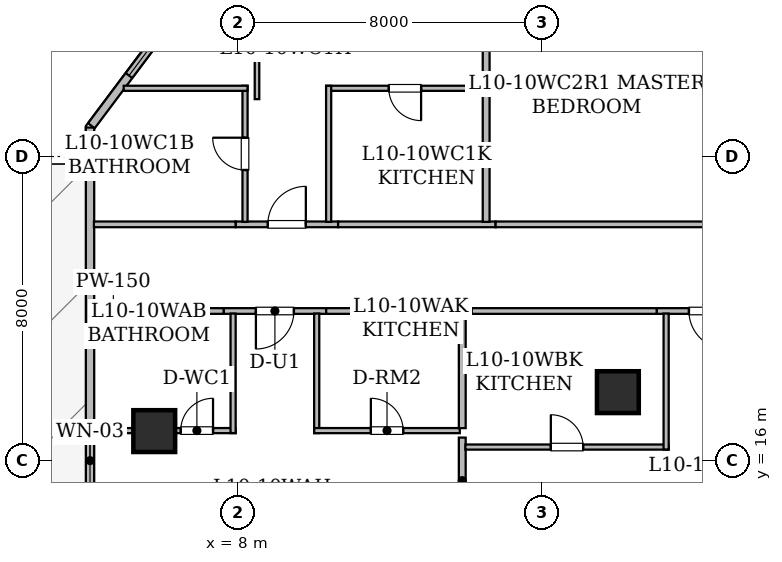
"""IFC4 building model, lengths in metres.
Left out: names, types, materials, properties, quantities, classifications, styles, units other than length and angle.
Written with IfcOpenShell. Run it as: python <this file> out.ifc"""

import sys

from ifc_helpers import new_model, si_unit, direction, frame, frame_2d, origin, origin_2d, place, context, subcontext, project, spatial, rectangle, hollow_rectangle, extrude, element, fill, save


model = new_model("IFC4")
c1 = context("Model", 3, precision=1e-05, world=origin(), true_north=direction((0.0, 1.0)))
c2 = subcontext(c1, "Body", "Model", "MODEL_VIEW")
j1 = project(units=[si_unit("LENGTHUNIT", "METRE"), si_unit("PLANEANGLEUNIT", "RADIAN")], contexts=[c1])
p1 = place(None, origin())
s1 = spatial("IfcSite", under=j1, at=p1, CompositionType="ELEMENT")
p2 = place(p1, origin())
s2 = spatial("IfcBuilding", under=s1, at=p2, CompositionType="ELEMENT")
p3 = place(p2, frame((0.0, 0.0, 44.25)))
s3 = spatial("IfcBuildingStorey", under=s2, at=p3, CompositionType="ELEMENT", Elevation=44.25)
for number, where, z_axis, x_axis in (
    (1, (5.8, 16.775, 0.0), (0.0, 0.0, 1.0), (1.0, 0.0, 0.0)),
    (2, (18.0, 17.8, 0.0), (0.0, 0.0, 1.0), (1.0, 0.0, 0.0)),
):
    element("IfcColumn", number, at=place(p3, frame(where, z_axis=z_axis, x_axis=x_axis)), inside=s3, PredefinedType="COLUMN", context=c2, shape_type="SweptSolid", body=[
        extrude(hollow_rectangle(XDim=1.1, YDim=1.1, WallThickness=0.055, at=origin_2d()), origin(), (0.0, 0.0, 1.0), 3.65),
    ])
p4 = place(p3, frame((4.11, 7.317, 0.0), z_axis=(0.0, 0.0, 1.0), x_axis=(0.0, 1.0, 0.0)))
e3 = element("IfcWall", 3, at=p4, inside=s3, PredefinedType="STANDARD", context=c2, shape_type="SweptSolid", body=[
    extrude(rectangle(XDim=17.446, YDim=0.22, at=frame_2d((8.723, 0.0))), origin(), (0.0, 0.0, 1.0), 3.43),
])
p5 = place(p4, frame((4.989, 0.0, 0.0)))
e4 = element("IfcOpeningElement", 4, at=p5, cuts=e3, PredefinedType="OPENING", context=c2, shape_type="SweptSolid", body=[
    extrude(rectangle(XDim=1.1, YDim=2.2, at=frame_2d((0.55, 1.1))), frame((0.0, 0.12, 0.0), z_axis=(0.0, -1.0, 0.0), x_axis=(1.0, 0.0, 0.0)), (0.0, 0.0, 1.0), 0.24),
])
p6 = place(p4, frame((8.081, 0.0, 0.8)))
e5 = element("IfcOpeningElement", 5, at=p6, cuts=e3, PredefinedType="OPENING", context=c2, shape_type="SweptSolid", body=[
    extrude(rectangle(XDim=1.2, YDim=1.5, at=frame_2d((0.6, 0.75))), frame((0.0, 0.12, 0.0), z_axis=(0.0, -1.0, 0.0), x_axis=(1.0, 0.0, 0.0)), (0.0, 0.0, 1.0), 0.24),
])
p7 = place(p3, frame((4.145, 24.809, 0.0), z_axis=(0.0, 0.0, 1.0), x_axis=(0.599823674734, 0.800132213592, 0.0)))
e6 = element("IfcWall", 6, at=p7, inside=s3, PredefinedType="STANDARD", context=c2, shape_type="SweptSolid", body=[
    extrude(rectangle(XDim=3.988, YDim=0.22, at=frame_2d((1.994, 0.0))), origin(), (0.0, 0.0, 1.0), 3.43),
])
p8 = place(p7, frame((1.651, 0.0, 0.85)))
e7 = element("IfcOpeningElement", 7, at=p8, cuts=e6, PredefinedType="OPENING", context=c2, shape_type="SweptSolid", body=[
    extrude(rectangle(XDim=1.65, YDim=1.55, at=frame_2d((0.825, 0.775))), frame((0.0, 0.12, 0.0), z_axis=(0.0, -1.0, 0.0), x_axis=(1.0, 0.0, 0.0)), (0.0, 0.0, 1.0), 0.24),
])
p9 = place(p3, frame((10.324, 19.935, 0.0), z_axis=(0.0, 0.0, 1.0), x_axis=(-1.0, 0.0, 0.0)))
e8 = element("IfcWall", 8, at=p9, inside=s3, PredefinedType="STANDARD", context=c2, shape_type="SweptSolid", body=[
    extrude(rectangle(XDim=2.698, YDim=0.15, at=frame_2d((1.349, 0.0))), origin(), (0.0, 0.0, 1.0), 3.43),
])
p10 = place(p9, frame((0.849, 0.0, 0.0)))
e9 = element("IfcOpeningElement", 9, at=p10, cuts=e8, PredefinedType="OPENING", context=c2, shape_type="SweptSolid", body=[
    extrude(rectangle(XDim=1.0, YDim=2.15, at=frame_2d((0.5, 1.075))), frame((0.0, 0.085, 0.0), z_axis=(0.0, -1.0, 0.0), x_axis=(1.0, 0.0, 0.0)), (0.0, 0.0, 1.0), 0.17),
])
p11 = place(p3, frame((7.626, 19.935, 0.0), z_axis=(0.0, 0.0, 1.0), x_axis=(-1.0, 0.0, 0.0)))
e10 = element("IfcWall", 10, at=p11, inside=s3, PredefinedType="STANDARD", context=c2, shape_type="SweptSolid", body=[
    extrude(rectangle(XDim=3.414, YDim=0.15, at=frame_2d((1.707, 0.0))), origin(), (0.0, 0.0, 1.0), 2.803),
])
p12 = place(p3, frame((14.154, 19.935, 0.0), z_axis=(0.0, 0.0, 1.0), x_axis=(-1.0, 0.0, 0.0)))
e11 = element("IfcWall", 11, at=p12, inside=s3, PredefinedType="STANDARD", context=c2, shape_type="SweptSolid", body=[
    extrude(rectangle(XDim=3.83, YDim=0.15, at=frame_2d((1.915, 0.0))), origin(), (0.0, 0.0, 1.0), 3.43),
])
p13 = place(p3, frame((21.719, 19.935, 0.0), z_axis=(0.0, 0.0, 1.0), x_axis=(-1.0, 0.0, 0.0)))
e12 = element("IfcWall", 12, at=p13, inside=s3, PredefinedType="STANDARD", context=c2, shape_type="SweptSolid", body=[
    extrude(rectangle(XDim=2.698, YDim=0.15, at=frame_2d((1.349, 0.0))), origin(), (0.0, 0.0, 1.0), 3.43),
])
p14 = place(p13, frame((0.849, 0.0, 0.0)))
e13 = element("IfcOpeningElement", 13, at=p14, cuts=e12, PredefinedType="OPENING", context=c2, shape_type="SweptSolid", body=[
    extrude(rectangle(XDim=1.0, YDim=2.15, at=frame_2d((0.5, 1.075))), frame((0.0, 0.085, 0.0), z_axis=(0.0, -1.0, 0.0), x_axis=(1.0, 0.0, 0.0)), (0.0, 0.0, 1.0), 0.17),
])
p15 = place(p3, frame((19.021, 19.935, 0.0), z_axis=(0.0, 0.0, 1.0), x_axis=(-1.0, 0.0, 0.0)))
e14 = element("IfcWall", 14, at=p15, inside=s3, PredefinedType="STANDARD", context=c2, shape_type="SweptSolid", body=[
    extrude(rectangle(XDim=4.867, YDim=0.15, at=frame_2d((2.434, 0.0))), origin(), (0.0, 0.0, 1.0), 2.647),
])
p16 = place(p3, frame((7.94, 22.215, 0.0), z_axis=(0.0, 0.0, 1.0), x_axis=(1.0, 0.0, 0.0)))
e15 = element("IfcWall", 15, at=p16, inside=s3, PredefinedType="STANDARD", context=c2, shape_type="SweptSolid", body=[
    extrude(rectangle(XDim=2.698, YDim=0.15, at=frame_2d((1.349, 0.0))), origin(), (0.0, 0.0, 1.0), 3.43),
])
p17 = place(p16, frame((0.849, 0.0, 0.0)))
e16 = element("IfcOpeningElement", 16, at=p17, cuts=e15, PredefinedType="OPENING", context=c2, shape_type="SweptSolid", body=[
    extrude(rectangle(XDim=1.0, YDim=2.15, at=frame_2d((0.5, 1.075))), frame((0.0, 0.085, 0.0), z_axis=(0.0, -1.0, 0.0), x_axis=(1.0, 0.0, 0.0)), (0.0, 0.0, 1.0), 0.17),
])
p18 = place(p3, frame((4.212, 22.215, 0.0), z_axis=(0.0, 0.0, 1.0), x_axis=(1.0, 0.0, 0.0)))
e17 = element("IfcWall", 17, at=p18, inside=s3, PredefinedType="STANDARD", context=c2, shape_type="SweptSolid", body=[
    extrude(rectangle(XDim=3.728, YDim=0.15, at=frame_2d((1.864, 0.0))), origin(), (0.0, 0.0, 1.0), 2.803),
])
p19 = place(p3, frame((10.638, 22.215, 0.0), z_axis=(0.0, 0.0, 1.0), x_axis=(1.0, 0.0, 0.0)))
e18 = element("IfcWall", 18, at=p19, inside=s3, PredefinedType="STANDARD", context=c2, shape_type="SweptSolid", body=[
    extrude(rectangle(XDim=4.145, YDim=0.15, at=frame_2d((2.073, 0.0))), origin(), (0.0, 0.0, 1.0), 3.43),
])
p20 = place(p3, frame((14.783, 22.215, 0.0), z_axis=(0.0, 0.0, 1.0), x_axis=(1.0, 0.0, 0.0)))
e19 = element("IfcWall", 19, at=p20, inside=s3, PredefinedType="STANDARD", context=c2, shape_type="SweptSolid", body=[
    extrude(rectangle(XDim=6.712, YDim=0.15, at=frame_2d((3.356, 0.0))), origin(), (0.0, 0.0, 1.0), 2.647),
])
p21 = place(p3, frame((4.212, 16.788, 0.0), z_axis=(0.0, 0.0, 1.0), x_axis=(1.0, 0.0, 0.0)))
e20 = element("IfcWall", 20, at=p21, inside=s3, PredefinedType="PARTITIONING", context=c2, shape_type="SweptSolid", body=[
    extrude(rectangle(XDim=3.728, YDim=0.135, at=frame_2d((1.864, 0.0))), origin(), (0.0, 0.0, 1.0), 2.647),
])
p22 = place(p21, frame((2.285, 0.0, 0.0)))
e21 = element("IfcOpeningElement", 21, at=p22, cuts=e20, PredefinedType="OPENING", context=c2, shape_type="SweptSolid", body=[
    extrude(rectangle(XDim=0.85, YDim=2.1, at=frame_2d((0.425, 1.05))), frame((0.0, 0.077, 0.0), z_axis=(0.0, -1.0, 0.0), x_axis=(1.0, 0.0, 0.0)), (0.0, 0.0, 1.0), 0.155),
])
for number, where, z_axis, x_axis in (
    (22, (7.875, 16.723, 0.0), (0.0, 0.0, 1.0), (0.0, 1.0, 0.0)),
    (23, (10.075, 19.868, 0.0), (0.0, 0.0, 1.0), (0.0, -1.0, 0.0)),
):
    element("IfcWall", number, at=place(p3, frame(where, z_axis=z_axis, x_axis=x_axis)), inside=s3, PredefinedType="PARTITIONING", context=c2, shape_type="SweptSolid", body=[
        extrude(rectangle(XDim=3.145, YDim=0.135, at=frame_2d((1.573, 0.0))), origin(), (0.0, 0.0, 1.0), 2.647),
    ])
p23 = place(p3, frame((10.01, 16.788, 0.0), z_axis=(0.0, 0.0, 1.0), x_axis=(1.0, 0.0, 0.0)))
e24 = element("IfcWall", 24, at=p23, inside=s3, PredefinedType="PARTITIONING", context=c2, shape_type="SweptSolid", body=[
    extrude(rectangle(XDim=3.83, YDim=0.135, at=frame_2d((1.915, 0.0))), origin(), (0.0, 0.0, 1.0), 2.647),
])
p24 = place(p23, frame((1.49, 0.0, 0.0)))
e25 = element("IfcOpeningElement", 25, at=p24, cuts=e24, PredefinedType="OPENING", context=c2, shape_type="SweptSolid", body=[
    extrude(rectangle(XDim=0.85, YDim=2.1, at=frame_2d((0.425, 1.05))), frame((0.0, 0.077, 0.0), z_axis=(0.0, -1.0, 0.0), x_axis=(1.0, 0.0, 0.0)), (0.0, 0.0, 1.0), 0.155),
])
p25 = place(p3, frame((13.905, 16.604, 0.0), z_axis=(0.0, 0.0, 1.0), x_axis=(0.0, -1.0, 0.0)))
e26 = element("IfcWall", 26, at=p25, inside=s3, PredefinedType="STANDARD", context=c2, shape_type="SweptSolid", body=[
    extrude(rectangle(XDim=1.331, YDim=0.18, at=frame_2d((0.666, 0.0))), origin(), (0.0, 0.0, 1.0), 3.43),
])
p26 = place(p3, frame((13.905, 19.868, 0.0), z_axis=(0.0, 0.0, 1.0), x_axis=(0.0, -1.0, 0.0)))
e27 = element("IfcWall", 27, at=p26, inside=s3, PredefinedType="STANDARD", context=c2, shape_type="SweptSolid", body=[
    extrude(rectangle(XDim=3.015, YDim=0.18, at=frame_2d((1.507, 0.0))), origin(), (0.0, 0.0, 1.0), 2.647),
])
p27 = place(p3, frame((13.987, 16.355, 0.0), z_axis=(0.0, 0.0, 1.0), x_axis=(1.0, 0.0, 0.0)))
e28 = element("IfcWall", 28, at=p27, inside=s3, PredefinedType="PARTITIONING", context=c2, shape_type="SweptSolid", body=[
    extrude(rectangle(XDim=5.348, YDim=0.135, at=frame_2d((2.674, 0.0))), origin(), (0.0, 0.0, 1.0), 2.647),
])
p28 = place(p27, frame((2.249, 0.0, 0.0)))
e29 = element("IfcOpeningElement", 29, at=p28, cuts=e28, PredefinedType="OPENING", context=c2, shape_type="SweptSolid", body=[
    extrude(rectangle(XDim=0.85, YDim=2.1, at=frame_2d((0.425, 1.05))), frame((0.0, 0.077, 0.0), z_axis=(0.0, -1.0, 0.0), x_axis=(1.0, 0.0, 0.0)), (0.0, 0.0, 1.0), 0.155),
])
p29 = place(p3, frame((19.27, 16.29, 0.0), z_axis=(0.0, 0.0, 1.0), x_axis=(0.0, 1.0, 0.0)))
e30 = element("IfcWall", 30, at=p29, inside=s3, PredefinedType="PARTITIONING", context=c2, shape_type="SweptSolid", body=[
    extrude(rectangle(XDim=3.578, YDim=0.135, at=frame_2d((1.789, 0.0))), origin(), (0.0, 0.0, 1.0), 2.647),
])
p30 = place(p3, frame((8.189, 22.28, 0.0), z_axis=(0.0, 0.0, 1.0), x_axis=(0.0, 1.0, 0.0)))
e31 = element("IfcWall", 31, at=p30, inside=s3, PredefinedType="PARTITIONING", context=c2, shape_type="SweptSolid", body=[
    extrude(rectangle(XDim=3.58, YDim=0.135, at=frame_2d((1.79, 0.0))), origin(), (0.0, 0.0, 1.0), 2.957),
])
p31 = place(p30, frame((1.365, 0.0, 0.0)))
e32 = element("IfcOpeningElement", 32, at=p31, cuts=e31, PredefinedType="OPENING", context=c2, shape_type="SweptSolid", body=[
    extrude(rectangle(XDim=0.85, YDim=2.1, at=frame_2d((0.425, 1.05))), frame((0.0, 0.077, 0.0), z_axis=(0.0, -1.0, 0.0), x_axis=(1.0, 0.0, 0.0)), (0.0, 0.0, 1.0), 0.155),
])
p32 = place(p3, frame((8.254, 25.795, 0.0), z_axis=(0.0, 0.0, 1.0), x_axis=(-1.0, 0.0, 0.0)))
e33 = element("IfcWall", 33, at=p32, inside=s3, PredefinedType="PARTITIONING", context=c2, shape_type="SweptSolid", body=[
    extrude(rectangle(XDim=3.258, YDim=0.135, at=frame_2d((1.629, 0.0))), origin(), (0.0, 0.0, 1.0), 2.803),
])
p33 = place(p3, frame((14.469, 25.795, 0.0), z_axis=(0.0, 0.0, 1.0), x_axis=(-1.0, 0.0, 0.0)))
e34 = element("IfcWall", 34, at=p33, inside=s3, PredefinedType="PARTITIONING", context=c2, shape_type="SweptSolid", body=[
    extrude(rectangle(XDim=4.145, YDim=0.135, at=frame_2d((2.073, 0.0))), origin(), (0.0, 0.0, 1.0), 3.43),
])
p34 = place(p33, frame((1.647, 0.0, 0.0)))
e35 = element("IfcOpeningElement", 35, at=p34, cuts=e34, PredefinedType="OPENING", context=c2, shape_type="SweptSolid", body=[
    extrude(rectangle(XDim=0.85, YDim=2.1, at=frame_2d((0.425, 1.05))), frame((0.0, 0.077, 0.0), z_axis=(0.0, -1.0, 0.0), x_axis=(1.0, 0.0, 0.0)), (0.0, 0.0, 1.0), 0.155),
])
p35 = place(p3, frame((10.389, 25.86, 0.0), z_axis=(0.0, 0.0, 1.0), x_axis=(0.0, -1.0, 0.0)))
e36 = element("IfcWall", 36, at=p35, inside=s3, PredefinedType="PARTITIONING", context=c2, shape_type="SweptSolid", body=[
    extrude(rectangle(XDim=3.58, YDim=0.135, at=frame_2d((1.79, 0.0))), origin(), (0.0, 0.0, 1.0), 2.957),
])
p36 = place(p3, frame((8.504, 25.51, 0.0), z_axis=(0.0, 0.0, 1.0), x_axis=(0.0, 1.0, 0.0)))
e37 = element("IfcWall", 37, at=p36, inside=s3, PredefinedType="PARTITIONING", context=c2, shape_type="SweptSolid", body=[
    extrude(rectangle(XDim=9.651, YDim=0.12, at=frame_2d((4.825, 0.0))), origin(), (0.0, 0.0, 1.0), 3.43),
])
p37 = place(p3, frame((14.534, 28.11, 0.0), z_axis=(0.0, 0.0, 1.0), x_axis=(0.0, -1.0, 0.0)))
e38 = element("IfcWall", 38, at=p37, inside=s3, PredefinedType="STANDARD", context=c2, shape_type="SweptSolid", body=[
    extrude(rectangle(XDim=2.25, YDim=0.18, at=frame_2d((1.125, 0.0))), origin(), (0.0, 0.0, 1.0), 3.43),
])
p38 = place(p3, frame((14.534, 25.73, 0.0), z_axis=(0.0, 0.0, 1.0), x_axis=(0.0, -1.0, 0.0)))
e39 = element("IfcWall", 39, at=p38, inside=s3, PredefinedType="STANDARD", context=c2, shape_type="SweptSolid", body=[
    extrude(rectangle(XDim=3.45, YDim=0.18, at=frame_2d((1.725, 0.0))), origin(), (0.0, 0.0, 1.0), 2.957),
])
p39 = place(p6, origin())
e40 = element("IfcWindow", 40, at=p39, inside=s3, PartitioningType="SINGLE_PANEL", PredefinedType="WINDOW", context=c2, shape_type="SweptSolid", body=[
    extrude(rectangle(XDim=1.2, YDim=1.5, at=frame_2d((0.6, 0.75))), frame((0.0, 0.03, 0.0), z_axis=(0.0, -1.0, 0.0), x_axis=(1.0, 0.0, 0.0)), (0.0, 0.0, 1.0), 0.06),
])
fill(e5, e40)
p40 = place(p8, origin())
e41 = element("IfcWindow", 41, at=p40, inside=s3, PartitioningType="SINGLE_PANEL", PredefinedType="WINDOW", context=c2, shape_type="SweptSolid", body=[
    extrude(rectangle(XDim=1.65, YDim=1.55, at=frame_2d((0.825, 0.775))), frame((0.0, 0.03, 0.0), z_axis=(0.0, -1.0, 0.0), x_axis=(1.0, 0.0, 0.0)), (0.0, 0.0, 1.0), 0.06),
])
fill(e7, e41)
p41 = place(p10, origin())
e42 = element("IfcDoor", 42, at=p41, inside=s3, OperationType="SINGLE_SWING_RIGHT", PredefinedType="DOOR", context=c2, shape_type="SweptSolid", body=[
    extrude(rectangle(XDim=1.0, YDim=2.15, at=frame_2d((0.5, 1.075))), frame((0.0, 0.025, 0.0), z_axis=(0.0, -1.0, 0.0), x_axis=(1.0, 0.0, 0.0)), (0.0, 0.0, 1.0), 0.05),
])
fill(e9, e42)
p42 = place(p14, origin())
e43 = element("IfcDoor", 43, at=p42, inside=s3, OperationType="SINGLE_SWING_LEFT", PredefinedType="DOOR", context=c2, shape_type="SweptSolid", body=[
    extrude(rectangle(XDim=1.0, YDim=2.15, at=frame_2d((0.5, 1.075))), frame((0.0, 0.025, 0.0), z_axis=(0.0, -1.0, 0.0), x_axis=(1.0, 0.0, 0.0)), (0.0, 0.0, 1.0), 0.05),
])
fill(e13, e43)
p43 = place(p17, origin())
e44 = element("IfcDoor", 44, at=p43, inside=s3, OperationType="SINGLE_SWING_RIGHT", PredefinedType="DOOR", context=c2, shape_type="SweptSolid", body=[
    extrude(rectangle(XDim=1.0, YDim=2.15, at=frame_2d((0.5, 1.075))), frame((0.0, 0.025, 0.0), z_axis=(0.0, -1.0, 0.0), x_axis=(1.0, 0.0, 0.0)), (0.0, 0.0, 1.0), 0.05),
])
fill(e16, e44)
p44 = place(p22, origin())
e45 = element("IfcDoor", 45, at=p44, inside=s3, OperationType="SINGLE_SWING_RIGHT", PredefinedType="DOOR", context=c2, shape_type="SweptSolid", body=[
    extrude(rectangle(XDim=0.85, YDim=2.1, at=frame_2d((0.425, 1.05))), frame((0.0, 0.025, 0.0), z_axis=(0.0, -1.0, 0.0), x_axis=(1.0, 0.0, 0.0)), (0.0, 0.0, 1.0), 0.05),
])
fill(e21, e45)
p45 = place(p24, origin())
e46 = element("IfcDoor", 46, at=p45, inside=s3, OperationType="SINGLE_SWING_LEFT", PredefinedType="DOOR", context=c2, shape_type="SweptSolid", body=[
    extrude(rectangle(XDim=0.85, YDim=2.1, at=frame_2d((0.425, 1.05))), frame((0.0, 0.025, 0.0), z_axis=(0.0, -1.0, 0.0), x_axis=(1.0, 0.0, 0.0)), (0.0, 0.0, 1.0), 0.05),
])
fill(e25, e46)
p46 = place(p28, origin())
e47 = element("IfcDoor", 47, at=p46, inside=s3, OperationType="SINGLE_SWING_LEFT", PredefinedType="DOOR", context=c2, shape_type="SweptSolid", body=[
    extrude(rectangle(XDim=0.85, YDim=2.1, at=frame_2d((0.425, 1.05))), frame((0.0, 0.025, 0.0), z_axis=(0.0, -1.0, 0.0), x_axis=(1.0, 0.0, 0.0)), (0.0, 0.0, 1.0), 0.05),
])
fill(e29, e47)
p47 = place(p31, origin())
e48 = element("IfcDoor", 48, at=p47, inside=s3, OperationType="SINGLE_SWING_RIGHT", PredefinedType="DOOR", context=c2, shape_type="SweptSolid", body=[
    extrude(rectangle(XDim=0.85, YDim=2.1, at=frame_2d((0.425, 1.05))), frame((0.0, 0.025, 0.0), z_axis=(0.0, -1.0, 0.0), x_axis=(1.0, 0.0, 0.0)), (0.0, 0.0, 1.0), 0.05),
])
fill(e32, e48)
p48 = place(p34, origin())
e49 = element("IfcDoor", 49, at=p48, inside=s3, OperationType="SINGLE_SWING_LEFT", PredefinedType="DOOR", context=c2, shape_type="SweptSolid", body=[
    extrude(rectangle(XDim=0.85, YDim=2.1, at=frame_2d((0.425, 1.05))), frame((0.0, 0.025, 0.0), z_axis=(0.0, -1.0, 0.0), x_axis=(1.0, 0.0, 0.0)), (0.0, 0.0, 1.0), 0.05),
])
fill(e35, e49)
save(model, sys.argv[1])
